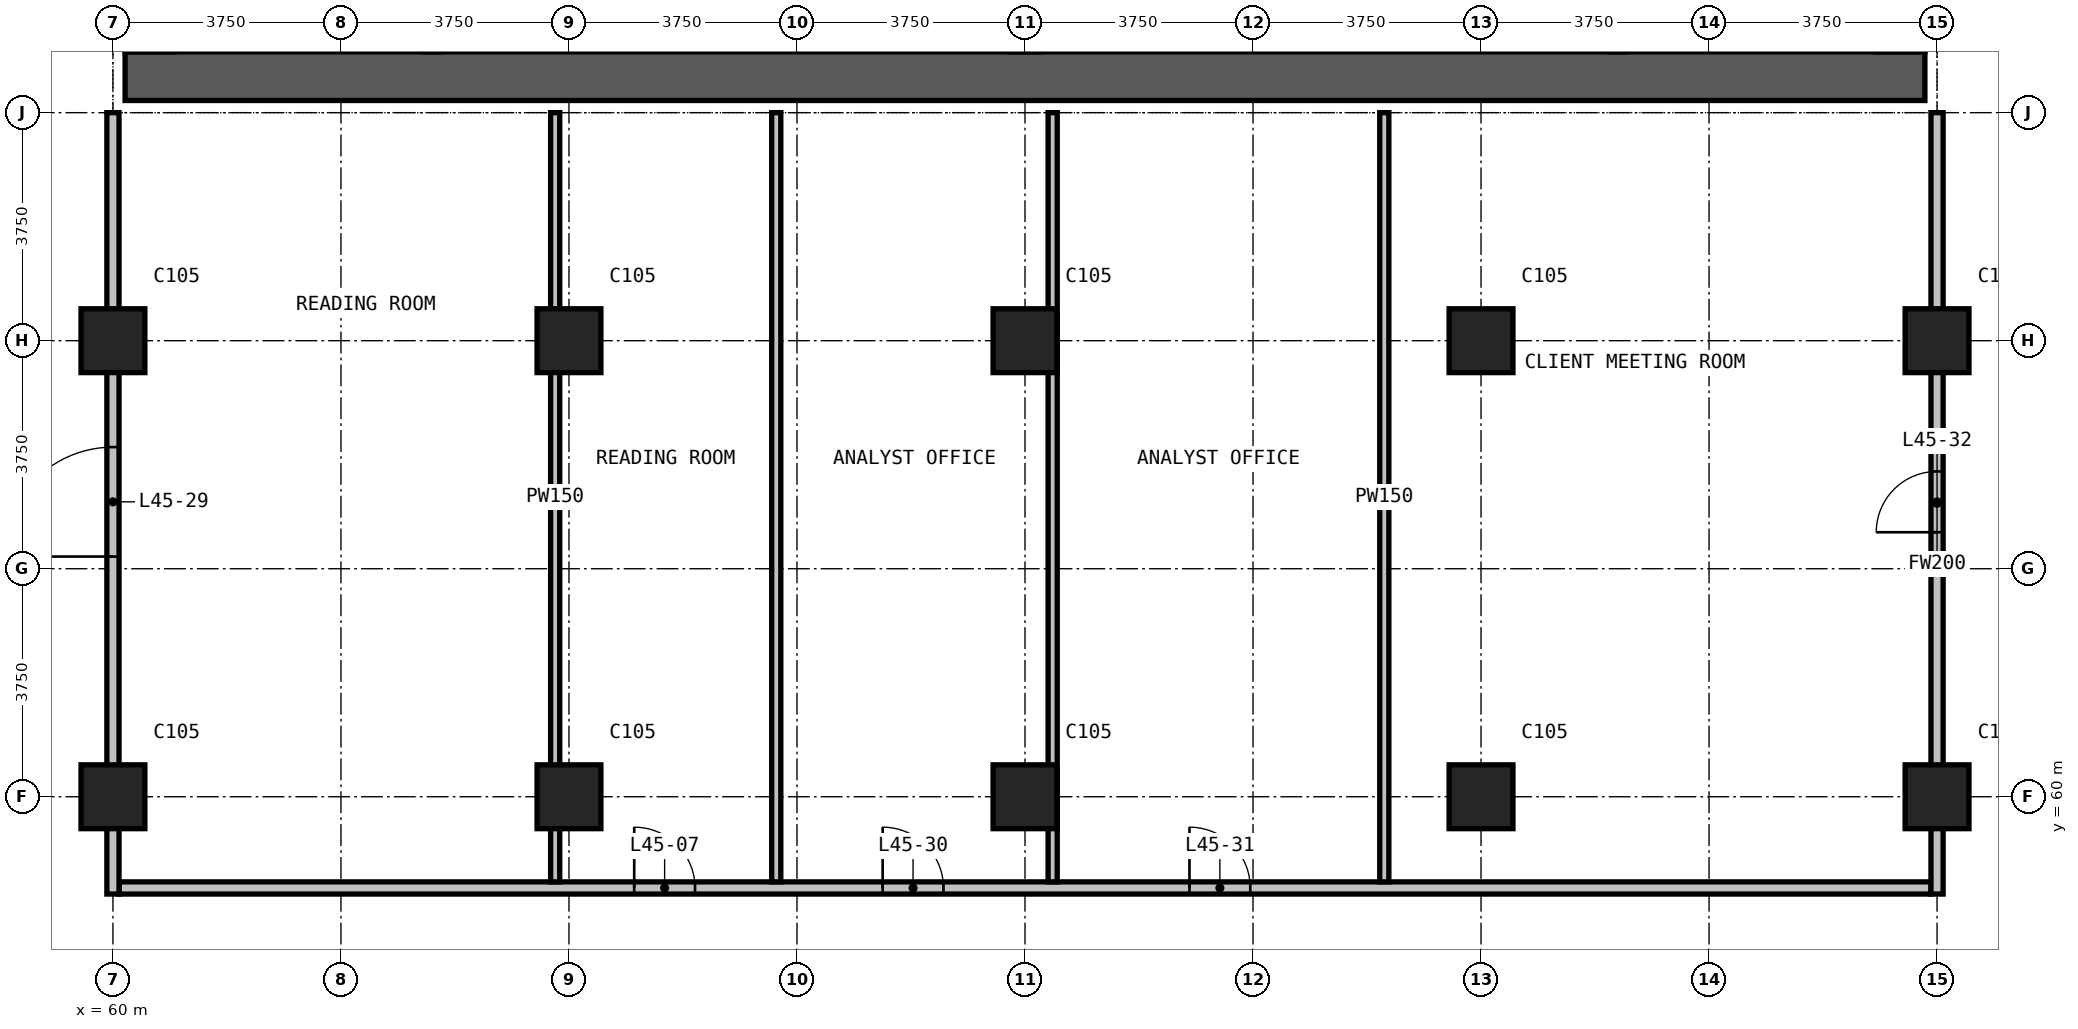
"""IFC4 building model, lengths in metres.
Left out: names, types, materials, properties, quantities, classifications, styles, units other than length and angle.
Written with IfcOpenShell. Run it as: python <this file> out.ifc"""

import sys

from ifc_helpers import new_model, si_unit, direction, frame, frame_2d, origin, origin_2d, place, context, subcontext, project, spatial, rectangle, extrude, element, fill, save


model = new_model("IFC4")
c1 = context("Model", 3, precision=1e-05, world=origin(), true_north=direction((0.0, 1.0)))
c2 = subcontext(c1, "Body", "Model", "MODEL_VIEW")
j1 = project(units=[si_unit("LENGTHUNIT", "METRE"), si_unit("PLANEANGLEUNIT", "RADIAN")], contexts=[c1])
p1 = place(None, origin())
s1 = spatial("IfcSite", under=j1, at=p1, CompositionType="ELEMENT")
p2 = place(p1, origin())
s2 = spatial("IfcBuilding", under=s1, at=p2, CompositionType="ELEMENT")
p3 = place(p2, frame((0.0, 0.0, 176.5)))
s3 = spatial("IfcBuildingStorey", under=s2, at=p3, CompositionType="ELEMENT", Elevation=176.5)
for number, where, z_axis, x_axis in (
    (1, (60.0, 60.0, 0.0), (0.0, 0.0, 1.0), (1.0, 0.0, 0.0)),
    (2, (60.0, 67.5, 0.0), (0.0, 0.0, 1.0), (1.0, 0.0, 0.0)),
    (3, (67.5, 60.0, 0.0), (0.0, 0.0, 1.0), (1.0, 0.0, 0.0)),
    (4, (67.5, 67.5, 0.0), (0.0, 0.0, 1.0), (1.0, 0.0, 0.0)),
    (5, (75.0, 60.0, 0.0), (0.0, 0.0, 1.0), (1.0, 0.0, 0.0)),
    (6, (75.0, 67.5, 0.0), (0.0, 0.0, 1.0), (1.0, 0.0, 0.0)),
    (7, (82.5, 60.0, 0.0), (0.0, 0.0, 1.0), (1.0, 0.0, 0.0)),
    (8, (82.5, 67.5, 0.0), (0.0, 0.0, 1.0), (1.0, 0.0, 0.0)),
    (9, (90.0, 60.0, 0.0), (0.0, 0.0, 1.0), (1.0, 0.0, 0.0)),
    (10, (90.0, 67.5, 0.0), (0.0, 0.0, 1.0), (1.0, 0.0, 0.0)),
):
    element("IfcColumn", number, at=place(p3, frame(where, z_axis=z_axis, x_axis=x_axis)), inside=s3, PredefinedType="COLUMN", context=c2, shape_type="SweptSolid", body=[
        extrude(rectangle(XDim=1.05, YDim=1.05, at=origin_2d()), origin(), (0.0, 0.0, 1.0), 3.6),
    ])
p4 = place(p3, frame((60.2, 71.85, 0.0), z_axis=(0.0, 0.0, 1.0), x_axis=(1.0, 0.0, 0.0)))
e11 = element("IfcWall", 11, at=p4, inside=s3, PredefinedType="SHEAR", context=c2, shape_type="SweptSolid", body=[
    extrude(rectangle(XDim=29.6, YDim=0.8, at=frame_2d((14.8, 0.0))), origin(), (0.0, 0.0, 1.0), 3.6),
])
p5 = place(p3, frame((60.1, 58.5, 0.0), z_axis=(0.0, 0.0, 1.0), x_axis=(1.0, 0.0, 0.0)))
e12 = element("IfcWall", 12, at=p5, inside=s3, PredefinedType="PARTITIONING", context=c2, shape_type="SweptSolid", body=[
    extrude(rectangle(XDim=29.8, YDim=0.2, at=frame_2d((14.9, 0.0))), origin(), (0.0, 0.0, 1.0), 3.3),
])
p6 = place(p5, frame((8.473, 0.0, 0.0)))
e13 = element("IfcOpeningElement", 13, at=p6, cuts=e12, PredefinedType="OPENING", context=c2, shape_type="SweptSolid", body=[
    extrude(rectangle(XDim=1.0, YDim=2.2, at=frame_2d((0.5, 1.1))), frame((0.0, 0.11, 0.0), z_axis=(0.0, -1.0, 0.0), x_axis=(1.0, 0.0, 0.0)), (0.0, 0.0, 1.0), 0.22),
])
p7 = place(p5, frame((12.559, 0.0, 0.0)))
e14 = element("IfcOpeningElement", 14, at=p7, cuts=e12, PredefinedType="OPENING", context=c2, shape_type="SweptSolid", body=[
    extrude(rectangle(XDim=1.0, YDim=2.2, at=frame_2d((0.5, 1.1))), frame((0.0, 0.11, 0.0), z_axis=(0.0, -1.0, 0.0), x_axis=(1.0, 0.0, 0.0)), (0.0, 0.0, 1.0), 0.22),
])
p8 = place(p5, frame((17.605, 0.0, 0.0)))
e15 = element("IfcOpeningElement", 15, at=p8, cuts=e12, PredefinedType="OPENING", context=c2, shape_type="SweptSolid", body=[
    extrude(rectangle(XDim=1.0, YDim=2.2, at=frame_2d((0.5, 1.1))), frame((0.0, 0.11, 0.0), z_axis=(0.0, -1.0, 0.0), x_axis=(1.0, 0.0, 0.0)), (0.0, 0.0, 1.0), 0.22),
])
p9 = place(p3, frame((60.0, 58.4, 0.0), z_axis=(0.0, 0.0, 1.0), x_axis=(0.0, 1.0, 0.0)))
e16 = element("IfcWall", 16, at=p9, inside=s3, PredefinedType="PARTITIONING", context=c2, shape_type="SweptSolid", body=[
    extrude(rectangle(XDim=12.85, YDim=0.2, at=frame_2d((6.425, 0.0))), origin(), (0.0, 0.0, 1.0), 3.3),
])
p10 = place(p9, frame((5.55, 0.0, 0.0)))
e17 = element("IfcOpeningElement", 17, at=p10, cuts=e16, PredefinedType="OPENING", context=c2, shape_type="SweptSolid", body=[
    extrude(rectangle(XDim=1.8, YDim=2.2, at=frame_2d((0.9, 1.1))), frame((0.0, 0.11, 0.0), z_axis=(0.0, -1.0, 0.0), x_axis=(1.0, 0.0, 0.0)), (0.0, 0.0, 1.0), 0.22),
])
p11 = place(p3, frame((90.0, 58.4, 0.0), z_axis=(0.0, 0.0, 1.0), x_axis=(0.0, 1.0, 0.0)))
e18 = element("IfcWall", 18, at=p11, inside=s3, PredefinedType="PARTITIONING", context=c2, shape_type="SweptSolid", body=[
    extrude(rectangle(XDim=12.85, YDim=0.2, at=frame_2d((6.425, 0.0))), origin(), (0.0, 0.0, 1.0), 3.3),
])
p12 = place(p11, frame((5.95, 0.0, 0.0)))
e19 = element("IfcOpeningElement", 19, at=p12, cuts=e18, PredefinedType="OPENING", context=c2, shape_type="SweptSolid", body=[
    extrude(rectangle(XDim=1.0, YDim=2.2, at=frame_2d((0.5, 1.1))), frame((0.0, 0.11, 0.0), z_axis=(0.0, -1.0, 0.0), x_axis=(1.0, 0.0, 0.0)), (0.0, 0.0, 1.0), 0.22),
])
for number, where, z_axis, x_axis in (
    (20, (67.273, 58.6, 0.0), (0.0, 0.0, 1.0), (0.0, 1.0, 0.0)),
    (21, (70.909, 58.6, 0.0), (0.0, 0.0, 1.0), (0.0, 1.0, 0.0)),
    (22, (75.455, 58.6, 0.0), (0.0, 0.0, 1.0), (0.0, 1.0, 0.0)),
    (23, (80.909, 58.6, 0.0), (0.0, 0.0, 1.0), (0.0, 1.0, 0.0)),
):
    element("IfcWall", number, at=place(p3, frame(where, z_axis=z_axis, x_axis=x_axis)), inside=s3, PredefinedType="PARTITIONING", context=c2, shape_type="SweptSolid", body=[
        extrude(rectangle(XDim=12.65, YDim=0.15, at=frame_2d((6.325, 0.0))), origin(), (0.0, 0.0, 1.0), 3.3),
    ])
p13 = place(p6, origin())
e24 = element("IfcDoor", 24, at=p13, inside=s3, OperationType="SINGLE_SWING_LEFT", PredefinedType="DOOR", context=c2, shape_type="SweptSolid", body=[
    extrude(rectangle(XDim=1.0, YDim=2.2, at=frame_2d((0.5, 1.1))), frame((0.0, 0.025, 0.0), z_axis=(0.0, -1.0, 0.0), x_axis=(1.0, 0.0, 0.0)), (0.0, 0.0, 1.0), 0.05),
])
fill(e13, e24)
p14 = place(p10, origin())
e25 = element("IfcDoor", 25, at=p14, inside=s3, OperationType="DOUBLE_DOOR_SINGLE_SWING", PredefinedType="DOOR", context=c2, shape_type="SweptSolid", body=[
    extrude(rectangle(XDim=1.8, YDim=2.2, at=frame_2d((0.9, 1.1))), frame((0.0, 0.025, 0.0), z_axis=(0.0, -1.0, 0.0), x_axis=(1.0, 0.0, 0.0)), (0.0, 0.0, 1.0), 0.05),
])
fill(e17, e25)
p15 = place(p7, origin())
e26 = element("IfcDoor", 26, at=p15, inside=s3, OperationType="SINGLE_SWING_LEFT", PredefinedType="DOOR", context=c2, shape_type="SweptSolid", body=[
    extrude(rectangle(XDim=1.0, YDim=2.2, at=frame_2d((0.5, 1.1))), frame((0.0, 0.025, 0.0), z_axis=(0.0, -1.0, 0.0), x_axis=(1.0, 0.0, 0.0)), (0.0, 0.0, 1.0), 0.05),
])
fill(e14, e26)
p16 = place(p8, origin())
e27 = element("IfcDoor", 27, at=p16, inside=s3, OperationType="SINGLE_SWING_LEFT", PredefinedType="DOOR", context=c2, shape_type="SweptSolid", body=[
    extrude(rectangle(XDim=1.0, YDim=2.2, at=frame_2d((0.5, 1.1))), frame((0.0, 0.025, 0.0), z_axis=(0.0, -1.0, 0.0), x_axis=(1.0, 0.0, 0.0)), (0.0, 0.0, 1.0), 0.05),
])
fill(e15, e27)
p17 = place(p12, origin())
e28 = element("IfcDoor", 28, at=p17, inside=s3, OperationType="SINGLE_SWING_LEFT", PredefinedType="DOOR", context=c2, shape_type="SweptSolid", body=[
    extrude(rectangle(XDim=1.0, YDim=2.2, at=frame_2d((0.5, 1.1))), frame((0.0, 0.025, 0.0), z_axis=(0.0, -1.0, 0.0), x_axis=(1.0, 0.0, 0.0)), (0.0, 0.0, 1.0), 0.05),
])
fill(e19, e28)
save(model, sys.argv[1])
